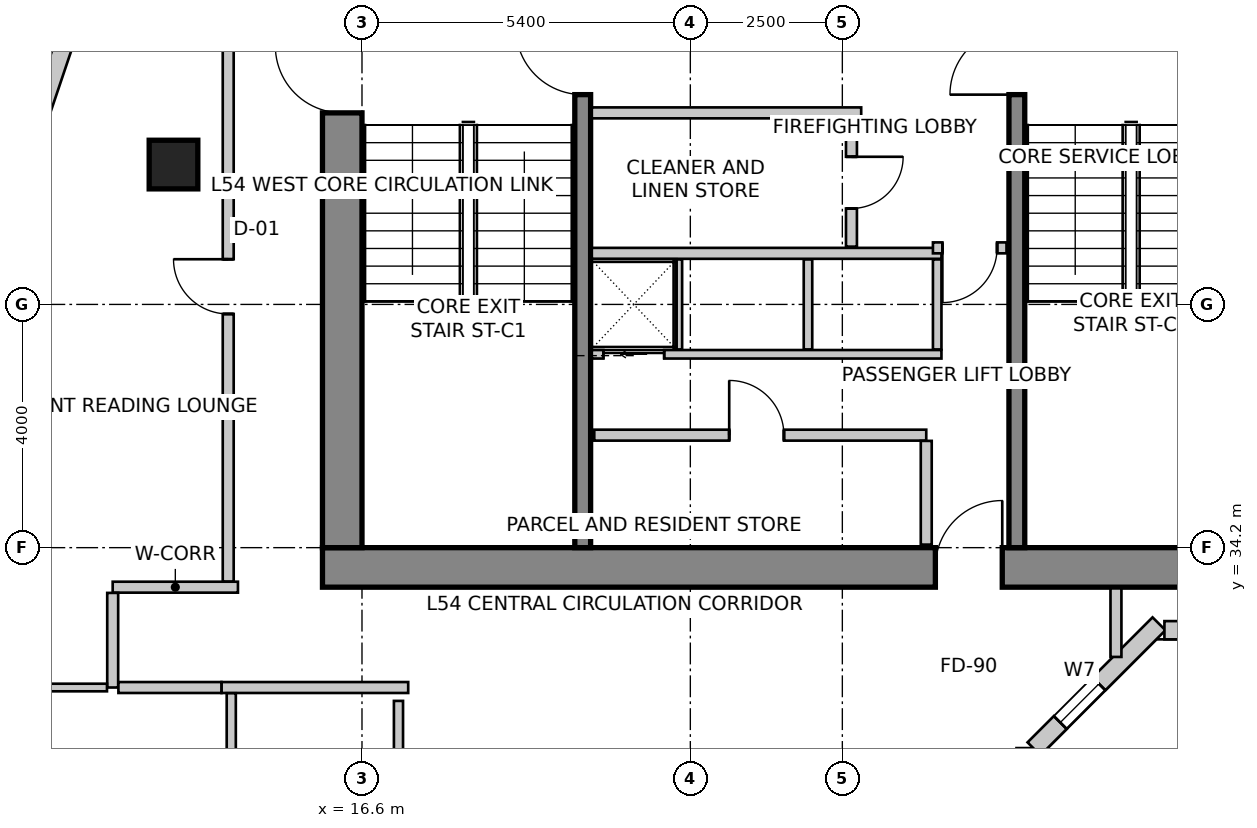
"""IFC4 building model, lengths in metres.
Left out: names, types, materials, properties, quantities, classifications, styles, units other than length and angle.
Written with IfcOpenShell. Run it as: python <this file> out.ifc"""

import sys

from ifc_helpers import new_model, si_unit, direction, frame, frame_2d, origin, origin_2d, place, context, subcontext, project, spatial, rectangle, extrude, source, transform, mapped, element, fill, save


model = new_model("IFC4")
c1 = context("Model", 3, precision=1e-05, world=origin(), true_north=direction((0.0, 1.0)))
c2 = subcontext(c1, "Body", "Model", "MODEL_VIEW")
j1 = project(units=[si_unit("LENGTHUNIT", "METRE"), si_unit("PLANEANGLEUNIT", "RADIAN")], contexts=[c1])
p1 = place(None, origin())
s1 = spatial("IfcSite", under=j1, at=p1, CompositionType="ELEMENT")
p2 = place(p1, origin())
s2 = spatial("IfcBuilding", under=s1, at=p2, CompositionType="ELEMENT")
p3 = place(p2, frame((0.0, 0.0, 214.9)))
s3 = spatial("IfcBuildingStorey", under=s2, at=p3, CompositionType="ELEMENT", Elevation=214.9)
p4 = place(p3, frame((15.95, 33.875, 0.0), z_axis=(0.0, 0.0, 1.0), x_axis=(1.0, 0.0, 0.0)))
e1 = element("IfcWall", 1, at=p4, inside=s3, PredefinedType="SHEAR", context=c2, shape_type="SweptSolid", body=[
    extrude(rectangle(XDim=15.7, YDim=0.65, at=frame_2d((7.85, 0.0))), origin(), (0.0, 0.0, 1.0), 3.5),
])
m1 = source(origin(), c2, "Body", "SweptSolid", [
    extrude(rectangle(XDim=1.1, YDim=2.15, at=frame_2d((0.55, 1.075))), frame((0.0, 0.335, 0.0), z_axis=(0.0, -1.0, 0.0), x_axis=(1.0, 0.0, 0.0)), (0.0, 0.0, 1.0), 0.67),
])
p5 = place(p4, frame((10.08, 0.0, 0.0)))
e2 = element("IfcOpeningElement", 2, at=p5, cuts=e1, PredefinedType="OPENING", context=c2, shape_type="MappedRepresentation", body=[
    mapped(m1, transform((0.0, 0.0, 0.0), scale=1.0)),
])
p6 = place(p3, frame((16.275, 34.2, 0.0), z_axis=(0.0, 0.0, 1.0), x_axis=(0.0, 1.0, 0.0)))
e3 = element("IfcWall", 3, at=p6, inside=s3, PredefinedType="SHEAR", context=c2, shape_type="SweptSolid", body=[
    extrude(rectangle(XDim=11.4, YDim=0.65, at=frame_2d((5.7, 0.0))), origin(), (0.0, 0.0, 1.0), 3.5),
])
p7 = place(p6, frame((7.15, 0.0, 0.0)))
e4 = element("IfcOpeningElement", 4, at=p7, cuts=e3, PredefinedType="OPENING", context=c2, shape_type="MappedRepresentation", body=[
    mapped(m1, transform((0.0, 0.0, 0.0), scale=1.0)),
])
p8 = place(p3, frame((20.23, 34.2, 0.0), z_axis=(0.0, 0.0, 1.0), x_axis=(0.0, 1.0, 0.0)))
e5 = element("IfcWall", 5, at=p8, inside=s3, PredefinedType="SHEAR", context=c2, shape_type="SweptSolid", body=[
    extrude(rectangle(XDim=9.06, YDim=0.26, at=frame_2d((4.53, 0.0))), origin(), (0.0, 0.0, 1.0), 3.5),
])
m2 = source(origin(), c2, "Body", "SweptSolid", [
    extrude(rectangle(XDim=1.1, YDim=2.15, at=frame_2d((0.55, 1.075))), frame((0.0, 0.14, 0.0), z_axis=(0.0, -1.0, 0.0), x_axis=(1.0, 0.0, 0.0)), (0.0, 0.0, 1.0), 0.28),
])
p9 = place(p8, frame((7.45, 0.0, 0.0)))
e6 = element("IfcOpeningElement", 6, at=p9, cuts=e5, PredefinedType="OPENING", context=c2, shape_type="MappedRepresentation", body=[
    mapped(m2, transform((0.0, 0.0, 0.0), scale=1.0)),
])
p10 = place(p3, frame((27.37, 34.2, 0.0), z_axis=(0.0, 0.0, 1.0), x_axis=(0.0, 1.0, 0.0)))
e7 = element("IfcWall", 7, at=p10, inside=s3, PredefinedType="SHEAR", context=c2, shape_type="SweptSolid", body=[
    extrude(rectangle(XDim=9.06, YDim=0.26, at=frame_2d((4.53, 0.0))), origin(), (0.0, 0.0, 1.0), 3.5),
])
p11 = place(p10, frame((7.45, 0.0, 0.0)))
e8 = element("IfcOpeningElement", 8, at=p11, cuts=e7, PredefinedType="OPENING", context=c2, shape_type="MappedRepresentation", body=[
    mapped(m2, transform((0.0, 0.0, 0.0), scale=1.0)),
])
m3 = source(origin(), c2, "Body", "SweptSolid", [
    extrude(rectangle(XDim=0.8, YDim=0.8, at=origin_2d()), origin(), (0.0, 0.0, 1.0), 3.5),
])
p12 = place(p3, frame((13.5, 40.5, 0.0), z_axis=(0.0, 0.0, 1.0), x_axis=(1.0, 0.0, 0.0)))
e9 = element("IfcColumn", 9, at=p12, inside=s3, PredefinedType="COLUMN", context=c2, shape_type="MappedRepresentation", body=[
    mapped(m3, transform((0.0, 0.0, 0.0), scale=1.0)),
])
p13 = place(p3, frame((27.514, 29.677, 0.0), z_axis=(0.0, 0.0, 1.0), x_axis=(0.0, 1.0, 0.0)))
e10 = element("IfcWall", 10, at=p13, inside=s3, PredefinedType="SOLIDWALL", context=c2, shape_type="SweptSolid", body=[
    extrude(rectangle(XDim=1.228, YDim=0.3, at=frame_2d((0.614, 0.0))), origin(), (0.0, 0.0, 1.0), 3.25),
])
p14 = place(p3, frame((27.652, 30.892, 0.0), z_axis=(0.0, 0.0, 1.0), x_axis=(0.707106781187, 0.707106781187, 0.0)))
e11 = element("IfcWall", 11, at=p14, inside=s3, PredefinedType="SOLIDWALL", context=c2, shape_type="SweptSolid", body=[
    extrude(rectangle(XDim=2.907, YDim=0.3, at=frame_2d((1.454, 0.0))), origin(), (0.0, 0.0, 1.0), 3.25),
])
m4 = source(origin(), c2, "Body", "SweptSolid", [
    extrude(rectangle(XDim=0.9, YDim=1.6, at=frame_2d((0.45, 0.8))), frame((0.0, 0.16, 0.0), z_axis=(0.0, -1.0, 0.0), x_axis=(1.0, 0.0, 0.0)), (0.0, 0.0, 1.0), 0.32),
])
p15 = place(p14, frame((0.611, 0.0, 0.85)))
e12 = element("IfcOpeningElement", 12, at=p15, cuts=e11, PredefinedType="OPENING", context=c2, shape_type="MappedRepresentation", body=[
    mapped(m4, transform((0.0, 0.0, 0.0), scale=1.0)),
])
p16 = place(p3, frame((29.797, 32.842, 0.0), z_axis=(0.0, 0.0, 1.0), x_axis=(1.0, 0.0, 0.0)))
e13 = element("IfcWall", 13, at=p16, inside=s3, PredefinedType="SOLIDWALL", context=c2, shape_type="SweptSolid", body=[
    extrude(rectangle(XDim=0.882, YDim=0.3, at=frame_2d((0.441, 0.0))), origin(), (0.0, 0.0, 1.0), 3.25),
])
p17 = place(p3, frame((13.269, 47.134, 0.0), z_axis=(0.0, 0.0, 1.0), x_axis=(-0.319920776449, -0.947444297464, 0.0)))
e14 = element("IfcWall", 14, at=p17, inside=s3, PredefinedType="SOLIDWALL", context=c2, shape_type="SweptSolid", body=[
    extrude(rectangle(XDim=16.133, YDim=0.3, at=frame_2d((8.067, 0.0))), origin(), (0.0, 0.0, 1.0), 3.25),
])
m5 = source(origin(), c2, "Body", "SweptSolid", [
    extrude(rectangle(XDim=2.4, YDim=2.2, at=frame_2d((1.2, 1.1))), frame((0.0, 0.16, 0.0), z_axis=(0.0, -1.0, 0.0), x_axis=(1.0, 0.0, 0.0)), (0.0, 0.0, 1.0), 0.32),
])
p18 = place(p17, frame((2.363, 0.0, 0.85)))
e15 = element("IfcOpeningElement", 15, at=p18, cuts=e14, PredefinedType="OPENING", context=c2, shape_type="MappedRepresentation", body=[
    mapped(m5, transform((0.0, 0.0, 0.0), scale=1.0)),
])
m6 = source(origin(), c2, "Body", "SweptSolid", [
    extrude(rectangle(XDim=2.1, YDim=2.0, at=frame_2d((1.05, 1.0))), frame((0.0, 0.16, 0.0), z_axis=(0.0, -1.0, 0.0), x_axis=(1.0, 0.0, 0.0)), (0.0, 0.0, 1.0), 0.32),
])
p19 = place(p17, frame((7.41, 0.0, 0.85)))
e16 = element("IfcOpeningElement", 16, at=p19, cuts=e14, PredefinedType="OPENING", context=c2, shape_type="MappedRepresentation", body=[
    mapped(m6, transform((0.0, 0.0, 0.0), scale=1.0)),
])
p20 = place(p17, frame((12.157, 0.0, 0.85)))
e17 = element("IfcOpeningElement", 17, at=p20, cuts=e14, PredefinedType="OPENING", context=c2, shape_type="MappedRepresentation", body=[
    mapped(m5, transform((0.0, 0.0, 0.0), scale=1.0)),
])
p21 = place(p3, frame((8.188, 31.834, 0.0), z_axis=(0.0, 0.0, 1.0), x_axis=(0.202303475707, -0.979322880217, 0.0)))
e18 = element("IfcWall", 18, at=p21, inside=s3, PredefinedType="SOLIDWALL", context=c2, shape_type="SweptSolid", body=[
    extrude(rectangle(XDim=15.766, YDim=0.3, at=frame_2d((7.883, 0.0))), origin(), (0.0, 0.0, 1.0), 3.25),
])
p22 = place(p21, frame((1.407, 0.0, 0.85)))
e19 = element("IfcOpeningElement", 19, at=p22, cuts=e18, PredefinedType="OPENING", context=c2, shape_type="MappedRepresentation", body=[
    mapped(m6, transform((0.0, 0.0, 0.0), scale=1.0)),
])
p23 = place(p21, frame((6.194, 0.0, 0.85)))
e20 = element("IfcOpeningElement", 20, at=p23, cuts=e18, PredefinedType="OPENING", context=c2, shape_type="MappedRepresentation", body=[
    mapped(m6, transform((0.0, 0.0, 0.0), scale=1.0)),
])
p24 = place(p21, frame((11.054, 0.0, 0.85)))
e21 = element("IfcOpeningElement", 21, at=p24, cuts=e18, PredefinedType="OPENING", context=c2, shape_type="MappedRepresentation", body=[
    mapped(m6, transform((0.0, 0.0, 0.0), scale=1.0)),
])
p25 = place(p3, frame((20.38, 37.38, 0.0), z_axis=(0.0, 0.0, 1.0), x_axis=(1.0, 0.0, 0.0)))
e22 = element("IfcWall", 22, at=p25, inside=s3, PredefinedType="SOLIDWALL", context=c2, shape_type="SweptSolid", body=[
    extrude(rectangle(XDim=5.75, YDim=0.14, at=frame_2d((2.875, 0.0))), origin(), (0.0, 0.0, 1.0), 3.25),
])
m7 = source(origin(), c2, "Body", "SweptSolid", [
    extrude(rectangle(XDim=1.0, YDim=2.15, at=frame_2d((0.5, 1.075))), frame((0.0, 0.08, 0.0), z_axis=(0.0, -1.0, 0.0), x_axis=(1.0, 0.0, 0.0)), (0.0, 0.0, 1.0), 0.16),
])
p26 = place(p25, frame((0.19, 0.0, 0.0)))
e23 = element("IfcOpeningElement", 23, at=p26, cuts=e22, PredefinedType="OPENING", context=c2, shape_type="MappedRepresentation", body=[
    mapped(m7, transform((0.0, 0.0, 0.0), scale=1.0)),
])
p27 = place(p3, frame((20.38, 39.04, 0.0), z_axis=(0.0, 0.0, 1.0), x_axis=(1.0, 0.0, 0.0)))
e24 = element("IfcWall", 24, at=p27, inside=s3, PredefinedType="SOLIDWALL", context=c2, shape_type="SweptSolid", body=[
    extrude(rectangle(XDim=5.75, YDim=0.18, at=frame_2d((2.875, 0.0))), origin(), (0.0, 0.0, 1.0), 3.25),
])
for number, where, z_axis, x_axis in (
    (25, (26.06, 37.46, 0.0), (0.0, 0.0, 1.0), (0.0, 1.0, 0.0)),
    (26, (21.795, 37.46, 0.0), (0.0, 0.0, 1.0), (0.0, 1.0, 0.0)),
    (27, (23.935, 37.46, 0.0), (0.0, 0.0, 1.0), (0.0, 1.0, 0.0)),
):
    element("IfcWall", number, at=place(p3, frame(where, z_axis=z_axis, x_axis=x_axis)), inside=s3, PredefinedType="SOLIDWALL", context=c2, shape_type="SweptSolid", body=[
        extrude(rectangle(XDim=1.48, YDim=0.14, at=frame_2d((0.74, 0.0))), origin(), (0.0, 0.0, 1.0), 3.25),
    ])
p28 = place(p3, frame((24.81, 41.35, 0.0), z_axis=(0.0, 0.0, 1.0), x_axis=(-1.0, 0.0, 0.0)))
e28 = element("IfcWall", 28, at=p28, inside=s3, PredefinedType="PARTITIONING", context=c2, shape_type="SweptSolid", body=[
    extrude(rectangle(XDim=4.43, YDim=0.18, at=frame_2d((2.215, 0.0))), origin(), (0.0, 0.0, 1.0), 3.25),
])
p29 = place(p3, frame((24.65, 41.256, 0.0), z_axis=(0.0, 0.0, 1.0), x_axis=(0.0, -1.0, 0.0)))
e29 = element("IfcWall", 29, at=p29, inside=s3, PredefinedType="PARTITIONING", context=c2, shape_type="SweptSolid", body=[
    extrude(rectangle(XDim=2.106, YDim=0.18, at=frame_2d((1.053, 0.0))), origin(), (0.0, 0.0, 1.0), 3.25),
])
m8 = source(origin(), c2, "Body", "SweptSolid", [
    extrude(rectangle(XDim=0.85, YDim=2.15, at=frame_2d((0.425, 1.075))), frame((0.0, 0.1, 0.0), z_axis=(0.0, -1.0, 0.0), x_axis=(1.0, 0.0, 0.0)), (0.0, 0.0, 1.0), 0.2),
])
p30 = place(p29, frame((0.628, 0.0, 0.0)))
e30 = element("IfcOpeningElement", 30, at=p30, cuts=e29, PredefinedType="OPENING", context=c2, shape_type="MappedRepresentation", body=[
    mapped(m8, transform((0.0, 0.0, 0.0), scale=1.0)),
])
p31 = place(p3, frame((27.2, 39.13, 0.0), z_axis=(0.0, 0.0, 1.0), x_axis=(-1.0, 0.0, 0.0)))
e31 = element("IfcWall", 31, at=p31, inside=s3, PredefinedType="PARTITIONING", context=c2, shape_type="SweptSolid", body=[
    extrude(rectangle(XDim=1.21, YDim=0.18, at=frame_2d((0.605, 0.0))), origin(), (0.0, 0.0, 1.0), 3.25),
])
m9 = source(origin(), c2, "Body", "SweptSolid", [
    extrude(rectangle(XDim=0.9, YDim=2.15, at=frame_2d((0.45, 1.075))), frame((0.0, 0.1, 0.0), z_axis=(0.0, -1.0, 0.0), x_axis=(1.0, 0.0, 0.0)), (0.0, 0.0, 1.0), 0.2),
])
p32 = place(p31, frame((0.155, 0.0, 0.0)))
e32 = element("IfcOpeningElement", 32, at=p32, cuts=e31, PredefinedType="OPENING", context=c2, shape_type="MappedRepresentation", body=[
    mapped(m9, transform((0.0, 0.0, 0.0), scale=1.0)),
])
p33 = place(p3, frame((20.42, 36.05, 0.0), z_axis=(0.0, 0.0, 1.0), x_axis=(1.0, 0.0, 0.0)))
e33 = element("IfcWall", 33, at=p33, inside=s3, PredefinedType="PARTITIONING", context=c2, shape_type="SweptSolid", body=[
    extrude(rectangle(XDim=5.46, YDim=0.18, at=frame_2d((2.73, 0.0))), origin(), (0.0, 0.0, 1.0), 3.25),
])
p34 = place(p33, frame((2.219, 0.0, 0.0)))
e34 = element("IfcOpeningElement", 34, at=p34, cuts=e33, PredefinedType="OPENING", context=c2, shape_type="MappedRepresentation", body=[
    mapped(m9, transform((0.0, 0.0, 0.0), scale=1.0)),
])
p35 = place(p3, frame((25.88, 35.956, 0.0), z_axis=(0.0, 0.0, 1.0), x_axis=(0.0, -1.0, 0.0)))
e35 = element("IfcWall", 35, at=p35, inside=s3, PredefinedType="PARTITIONING", context=c2, shape_type="SweptSolid", body=[
    extrude(rectangle(XDim=1.706, YDim=0.18, at=frame_2d((0.853, 0.0))), origin(), (0.0, 0.0, 1.0), 2.542),
])
p36 = place(p3, frame((12.5, 33.55, 0.0), z_axis=(0.0, 0.0, 1.0), x_axis=(1.0, 0.0, 0.0)))
e36 = element("IfcWall", 36, at=p36, inside=s3, PredefinedType="PARTITIONING", context=c2, shape_type="SweptSolid", body=[
    extrude(rectangle(XDim=2.06, YDim=0.18, at=frame_2d((1.03, 0.0))), origin(), (0.0, 0.0, 1.0), 3.25),
])
p37 = place(p3, frame((12.5, 31.9, 0.0), z_axis=(0.0, 0.0, 1.0), x_axis=(0.0, 1.0, 0.0)))
e37 = element("IfcWall", 37, at=p37, inside=s3, PredefinedType="PARTITIONING", context=c2, shape_type="SweptSolid", body=[
    extrude(rectangle(XDim=1.556, YDim=0.18, at=frame_2d((0.778, 0.0))), origin(), (0.0, 0.0, 1.0), 2.835),
])
p38 = place(p3, frame((29.0, 33.53, 0.0), z_axis=(0.0, 0.0, 1.0), x_axis=(0.0, -1.0, 0.0)))
e38 = element("IfcWall", 38, at=p38, inside=s3, PredefinedType="PARTITIONING", context=c2, shape_type="SweptSolid", body=[
    extrude(rectangle(XDim=1.127, YDim=0.18, at=frame_2d((0.563, 0.0))), origin(), (0.0, 0.0, 1.0), 3.25),
])
p39 = place(p3, frame((17.36, 31.9, 0.0), z_axis=(0.0, 0.0, 1.0), x_axis=(-1.0, 0.0, 0.0)))
e39 = element("IfcWall", 39, at=p39, inside=s3, PredefinedType="PARTITIONING", context=c2, shape_type="SweptSolid", body=[
    extrude(rectangle(XDim=3.07, YDim=0.18, at=frame_2d((1.535, 0.0))), origin(), (0.0, 0.0, 1.0), 2.835),
])
p40 = place(p3, frame((14.288, 31.9, 0.0), z_axis=(0.0, 0.0, 1.0), x_axis=(-1.0, 0.0, 0.0)))
e40 = element("IfcWall", 40, at=p40, inside=s3, PredefinedType="PARTITIONING", context=c2, shape_type="SweptSolid", body=[
    extrude(rectangle(XDim=1.694, YDim=0.18, at=frame_2d((0.847, 0.0))), origin(), (0.0, 0.0, 1.0), 2.835),
])
p41 = place(p3, frame((14.4, 33.644, 0.0), z_axis=(0.0, 0.0, 1.0), x_axis=(0.0, 1.0, 0.0)))
e41 = element("IfcWall", 41, at=p41, inside=s3, PredefinedType="PARTITIONING", context=c2, shape_type="SweptSolid", body=[
    extrude(rectangle(XDim=12.606, YDim=0.18, at=frame_2d((6.303, 0.0))), origin(), (0.0, 0.0, 1.0), 3.25),
])
p42 = place(p41, frame((4.399, 0.0, 0.0)))
e42 = element("IfcOpeningElement", 42, at=p42, cuts=e41, PredefinedType="OPENING", context=c2, shape_type="MappedRepresentation", body=[
    mapped(m9, transform((0.0, 0.0, 0.0), scale=1.0)),
])
p43 = place(p3, frame((12.406, 31.9, 0.0), z_axis=(0.0, 0.0, 1.0), x_axis=(-1.0, 0.0, 0.0)))
e43 = element("IfcWall", 43, at=p43, inside=s3, PredefinedType="PARTITIONING", context=c2, shape_type="SweptSolid", body=[
    extrude(rectangle(XDim=4.115, YDim=0.125, at=frame_2d((2.057, 0.0))), origin(), (0.0, 0.0, 1.0), 2.542),
])
p44 = place(p3, frame((14.45, 27.221, 0.0), z_axis=(0.0, 0.0, 1.0), x_axis=(0.0, 1.0, 0.0)))
e44 = element("IfcWall", 44, at=p44, inside=s3, PredefinedType="PARTITIONING", context=c2, shape_type="SweptSolid", body=[
    extrude(rectangle(XDim=4.585, YDim=0.15, at=frame_2d((2.292, 0.0))), origin(), (0.0, 0.0, 1.0), 2.766),
])
p45 = place(p3, frame((17.2, 31.68, 0.0), z_axis=(0.0, 0.0, 1.0), x_axis=(0.0, -1.0, 0.0)))
e45 = element("IfcWall", 45, at=p45, inside=s3, PredefinedType="PARTITIONING", context=c2, shape_type="SweptSolid", body=[
    extrude(rectangle(XDim=4.318, YDim=0.15, at=frame_2d((2.159, 0.0))), origin(), (0.0, 0.0, 1.0), 2.766),
])
m10 = source(origin(), c2, "Body", "SweptSolid", [
    extrude(rectangle(XDim=0.9, YDim=1.6, at=frame_2d((0.45, 0.8))), frame((0.0, -0.015, 0.0), z_axis=(0.0, -1.0, 0.0), x_axis=(1.0, 0.0, 0.0)), (0.0, 0.0, 1.0), 0.06),
])
p46 = place(p15, origin())
e46 = element("IfcWindow", 46, at=p46, inside=s3, PartitioningType="SINGLE_PANEL", PredefinedType="WINDOW", context=c2, shape_type="MappedRepresentation", body=[
    mapped(m10, transform((0.0, 0.0, 0.0), scale=1.0)),
])
fill(e12, e46)
m11 = source(origin(), c2, "Body", "SweptSolid", [
    extrude(rectangle(XDim=1.0, YDim=2.15, at=frame_2d((0.5, 1.075))), frame((0.0, 0.025, 0.0), z_axis=(0.0, -1.0, 0.0), x_axis=(1.0, 0.0, 0.0)), (0.0, 0.0, 1.0), 0.05),
])
p47 = place(p26, origin())
e47 = element("IfcDoor", 47, at=p47, inside=s3, OperationType="SLIDING_TO_LEFT", PredefinedType="DOOR", context=c2, shape_type="MappedRepresentation", body=[
    mapped(m11, transform((0.0, 0.0, 0.0), scale=1.0)),
])
fill(e23, e47)
m12 = source(origin(), c2, "Body", "SweptSolid", [
    extrude(rectangle(XDim=1.1, YDim=2.15, at=frame_2d((0.55, 1.075))), frame((0.0, 0.025, 0.0), z_axis=(0.0, -1.0, 0.0), x_axis=(1.0, 0.0, 0.0)), (0.0, 0.0, 1.0), 0.05),
])
p48 = place(p9, origin())
e48 = element("IfcDoor", 48, at=p48, inside=s3, OperationType="SINGLE_SWING_RIGHT", PredefinedType="DOOR", context=c2, shape_type="MappedRepresentation", body=[
    mapped(m12, transform((0.0, 0.0, 0.0), scale=1.0)),
])
fill(e6, e48)
p49 = place(p11, origin())
e49 = element("IfcDoor", 49, at=p49, inside=s3, OperationType="SINGLE_SWING_LEFT", PredefinedType="DOOR", context=c2, shape_type="MappedRepresentation", body=[
    mapped(m12, transform((0.0, 0.0, 0.0), scale=1.0)),
])
fill(e8, e49)
p50 = place(p7, origin())
e50 = element("IfcDoor", 50, at=p50, inside=s3, OperationType="SINGLE_SWING_RIGHT", PredefinedType="DOOR", context=c2, shape_type="MappedRepresentation", body=[
    mapped(m12, transform((0.0, 0.0, 0.0), scale=1.0)),
])
fill(e4, e50)
p51 = place(p5, origin())
e51 = element("IfcDoor", 51, at=p51, inside=s3, OperationType="SINGLE_SWING_RIGHT", PredefinedType="DOOR", context=c2, shape_type="MappedRepresentation", body=[
    mapped(m12, transform((0.0, 0.0, 0.0), scale=1.0)),
])
fill(e2, e51)
m13 = source(origin(), c2, "Body", "SweptSolid", [
    extrude(rectangle(XDim=0.85, YDim=2.15, at=frame_2d((0.425, 1.075))), frame((0.0, 0.025, 0.0), z_axis=(0.0, -1.0, 0.0), x_axis=(1.0, 0.0, 0.0)), (0.0, 0.0, 1.0), 0.05),
])
p52 = place(p30, origin())
e52 = element("IfcDoor", 52, at=p52, inside=s3, OperationType="SINGLE_SWING_LEFT", PredefinedType="DOOR", context=c2, shape_type="MappedRepresentation", body=[
    mapped(m13, transform((0.0, 0.0, 0.0), scale=1.0)),
])
fill(e30, e52)
m14 = source(origin(), c2, "Body", "SweptSolid", [
    extrude(rectangle(XDim=0.9, YDim=2.15, at=frame_2d((0.45, 1.075))), frame((0.0, 0.025, 0.0), z_axis=(0.0, -1.0, 0.0), x_axis=(1.0, 0.0, 0.0)), (0.0, 0.0, 1.0), 0.05),
])
p53 = place(p32, origin())
e53 = element("IfcDoor", 53, at=p53, inside=s3, OperationType="SINGLE_SWING_RIGHT", PredefinedType="DOOR", context=c2, shape_type="MappedRepresentation", body=[
    mapped(m14, transform((0.0, 0.0, 0.0), scale=1.0)),
])
fill(e32, e53)
p54 = place(p34, origin())
e54 = element("IfcDoor", 54, at=p54, inside=s3, OperationType="SINGLE_SWING_LEFT", PredefinedType="DOOR", context=c2, shape_type="MappedRepresentation", body=[
    mapped(m14, transform((0.0, 0.0, 0.0), scale=1.0)),
])
fill(e34, e54)
m15 = source(origin(), c2, "Body", "SweptSolid", [
    extrude(rectangle(XDim=0.9, YDim=2.15, at=frame_2d((0.45, 1.075))), frame((0.0, 0.025, 0.0), z_axis=(0.0, -1.0, 0.0), x_axis=(1.0, 0.0, 0.0)), (0.0, 0.0, 1.0), 0.05),
])
p55 = place(p42, origin())
e55 = element("IfcDoor", 55, at=p55, inside=s3, OperationType="SINGLE_SWING_RIGHT", PredefinedType="DOOR", context=c2, shape_type="MappedRepresentation", body=[
    mapped(m15, transform((0.0, 0.0, 0.0), scale=1.0)),
])
fill(e42, e55)
save(model, sys.argv[1])
